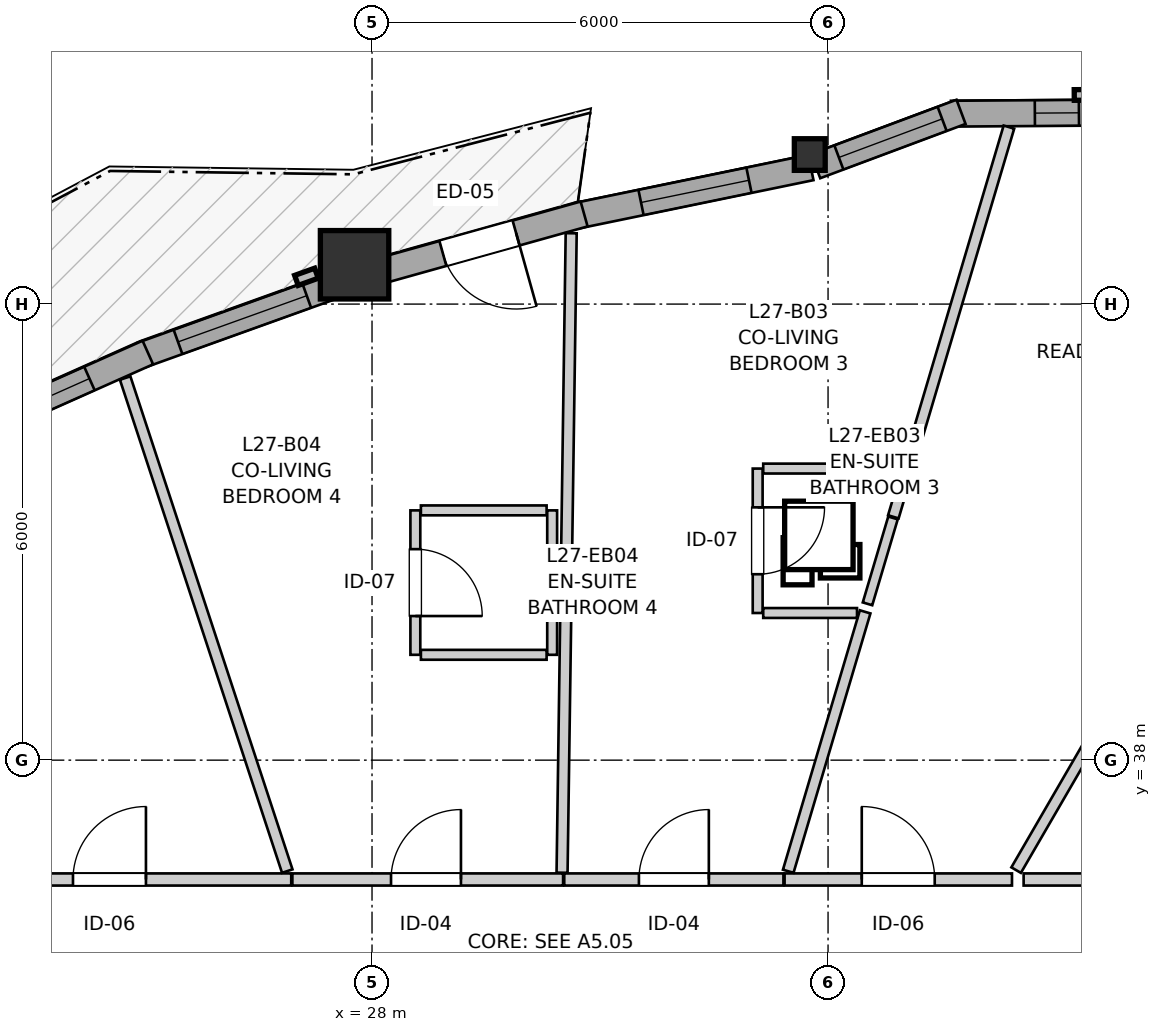
"""IFC4 building model, lengths in metres.
Left out: names, types, materials, properties, quantities, classifications, styles, units other than length and angle.
Written with IfcOpenShell. Run it as: python <this file> out.ifc"""

import sys

from ifc_helpers import new_model, si_unit, direction, frame, frame_2d, origin, origin_2d, place, context, subcontext, project, spatial, rectangle, i_section, extrude, source, transform, mapped, element, fill, save


model = new_model("IFC4")
c1 = context("Model", 3, precision=1e-05, world=origin(), true_north=direction((0.0, 1.0)))
c2 = subcontext(c1, "Body", "Model", "MODEL_VIEW")
j1 = project(units=[si_unit("LENGTHUNIT", "METRE"), si_unit("PLANEANGLEUNIT", "RADIAN")], contexts=[c1])
p1 = place(None, origin())
s1 = spatial("IfcSite", under=j1, at=p1, CompositionType="ELEMENT")
p2 = place(p1, origin())
s2 = spatial("IfcBuilding", under=s1, at=p2, CompositionType="ELEMENT")
p3 = place(p2, frame((0.0, 0.0, 92.8)))
s3 = spatial("IfcBuildingStorey", under=s2, at=p3, CompositionType="ELEMENT", Elevation=92.8)
m1 = source(origin(), c2, "Body", "SweptSolid", [
    extrude(i_section(OverallWidth=0.406, OverallDepth=0.416, WebThickness=0.027, FlangeThickness=0.044, FilletRadius=0.015, at=origin_2d()), origin(), (0.0, 0.0, 1.0), 2.95),
])
p4 = place(p3, frame((33.76, 45.968, 0.0), z_axis=(0.0, 0.0, 1.0), x_axis=(1.0, 0.0, 0.0)))
e1 = element("IfcColumn", 1, at=p4, inside=s3, PredefinedType="PILASTER", context=c2, shape_type="MappedRepresentation", body=[
    mapped(m1, transform((0.0, 0.0, 0.0), x_axis=(1.0, 0.0, 0.0), y_axis=(0.0, 1.0, 0.0), z_axis=(0.0, 0.0, 1.0), scale=1.0)),
])
m2 = source(origin(), c2, "Body", "SweptSolid", [
    extrude(rectangle(XDim=0.9, YDim=0.9, at=origin_2d()), origin(), (0.0, 0.0, 1.0), 2.95),
])
p5 = place(p3, frame((27.77, 44.517, 0.0), z_axis=(0.0, 0.0, 1.0), x_axis=(1.0, 0.0, 0.0)))
e2 = element("IfcColumn", 2, at=p5, inside=s3, PredefinedType="COLUMN", context=c2, shape_type="MappedRepresentation", body=[
    mapped(m2, transform((0.0, 0.0, 0.0), x_axis=(1.0, 0.0, 0.0), y_axis=(0.0, 1.0, 0.0), z_axis=(0.0, 0.0, 1.0), scale=1.0)),
])
p6 = place(p3, frame((37.717, 46.519, 0.0), z_axis=(0.0, 0.0, 1.0), x_axis=(-0.999976451414, -0.006862697526, 0.0)))
e3 = element("IfcWall", 3, at=p6, inside=s3, PredefinedType="SOLIDWALL", context=c2, shape_type="SweptSolid", body=[
    extrude(rectangle(XDim=2.099, YDim=0.34, at=frame_2d((1.049, 0.0))), origin(), (0.0, 0.0, 1.0), 2.48),
])
p7 = place(p6, frame((0.416, 0.0, 0.82)))
e4 = element("IfcOpeningElement", 4, at=p7, cuts=e3, PredefinedType="OPENING", context=c2, shape_type="SweptSolid", body=[
    extrude(rectangle(XDim=0.58, YDim=1.35, at=frame_2d((0.29, 0.675))), frame((0.0, 0.18, 0.0), z_axis=(0.0, -1.0, 0.0), x_axis=(1.0, 0.0, 0.0)), (0.0, 0.0, 1.0), 0.36),
])
p8 = place(p3, frame((35.75, 46.529, 0.0), z_axis=(0.0, 0.0, 1.0), x_axis=(-0.9368002254, -0.349864741994, 0.0)))
e5 = element("IfcWall", 5, at=p8, inside=s3, PredefinedType="SOLIDWALL", context=c2, shape_type="SweptSolid", body=[
    extrude(rectangle(XDim=2.041, YDim=0.34, at=frame_2d((1.021, 0.0))), origin(), (0.0, 0.0, 1.0), 2.48),
])
p9 = place(p8, frame((0.265, 0.0, 0.82)))
e6 = element("IfcOpeningElement", 6, at=p9, cuts=e5, PredefinedType="OPENING", context=c2, shape_type="SweptSolid", body=[
    extrude(rectangle(XDim=1.45, YDim=1.25, at=frame_2d((0.725, 0.625))), frame((0.0, 0.18, 0.0), z_axis=(0.0, -1.0, 0.0), x_axis=(1.0, 0.0, 0.0)), (0.0, 0.0, 1.0), 0.36),
])
p10 = place(p3, frame((33.774, 45.797, 0.0), z_axis=(0.0, 0.0, 1.0), x_axis=(-0.979428519707, -0.201791414051, 0.0)))
e7 = element("IfcWall", 7, at=p10, inside=s3, PredefinedType="SOLIDWALL", context=c2, shape_type="SweptSolid", body=[
    extrude(rectangle(XDim=3.134, YDim=0.34, at=frame_2d((1.567, 0.0))), origin(), (0.0, 0.0, 1.0), 2.48),
])
p11 = place(p10, frame((0.832, 0.0, 0.82)))
e8 = element("IfcOpeningElement", 8, at=p11, cuts=e7, PredefinedType="OPENING", context=c2, shape_type="SweptSolid", body=[
    extrude(rectangle(XDim=1.45, YDim=1.25, at=frame_2d((0.725, 0.625))), frame((0.0, 0.18, 0.0), z_axis=(0.0, -1.0, 0.0), x_axis=(1.0, 0.0, 0.0)), (0.0, 0.0, 1.0), 0.36),
])
p12 = place(p3, frame((30.79, 45.185, 0.0), z_axis=(0.0, 0.0, 1.0), x_axis=(-0.963052677404, -0.269313090187, 0.0)))
e9 = element("IfcWall", 9, at=p12, inside=s3, PredefinedType="SOLIDWALL", context=c2, shape_type="SweptSolid", body=[
    extrude(rectangle(XDim=2.858, YDim=0.34, at=frame_2d((1.429, 0.0))), origin(), (0.0, 0.0, 1.0), 2.48),
])
p13 = place(p12, frame((0.929, 0.0, 0.0)))
e10 = element("IfcOpeningElement", 10, at=p13, cuts=e9, PredefinedType="OPENING", context=c2, shape_type="SweptSolid", body=[
    extrude(rectangle(XDim=1.0, YDim=2.1, at=frame_2d((0.5, 1.05))), frame((0.0, 0.18, 0.0), z_axis=(0.0, -1.0, 0.0), x_axis=(1.0, 0.0, 0.0)), (0.0, 0.0, 1.0), 0.36),
])
p14 = place(p3, frame((27.611, 44.28, 0.0), z_axis=(0.0, 0.0, 1.0), x_axis=(-0.94110108123, -0.338125353836, 0.0)))
e11 = element("IfcWall", 11, at=p14, inside=s3, PredefinedType="SOLIDWALL", context=c2, shape_type="SweptSolid", body=[
    extrude(rectangle(XDim=2.809, YDim=0.34, at=frame_2d((1.404, 0.0))), origin(), (0.0, 0.0, 1.0), 2.48),
])
p15 = place(p14, frame((0.499, 0.0, 0.82)))
e12 = element("IfcOpeningElement", 12, at=p15, cuts=e11, PredefinedType="OPENING", context=c2, shape_type="SweptSolid", body=[
    extrude(rectangle(XDim=1.8, YDim=1.45, at=frame_2d((0.9, 0.725))), frame((0.0, 0.18, 0.0), z_axis=(0.0, -1.0, 0.0), x_axis=(1.0, 0.0, 0.0)), (0.0, 0.0, 1.0), 0.36),
])
p16 = place(p3, frame((25.05, 43.363, 0.0), z_axis=(0.0, 0.0, 1.0), x_axis=(-0.913433400489, -0.406988234315, 0.0)))
e13 = element("IfcWall", 13, at=p16, inside=s3, PredefinedType="SOLIDWALL", context=c2, shape_type="SweptSolid", body=[
    extrude(rectangle(XDim=2.985, YDim=0.34, at=frame_2d((1.492, 0.0))), origin(), (0.0, 0.0, 1.0), 2.48),
])
p17 = place(p16, frame((0.841, 0.0, 0.82)))
e14 = element("IfcOpeningElement", 14, at=p17, cuts=e13, PredefinedType="OPENING", context=c2, shape_type="SweptSolid", body=[
    extrude(rectangle(XDim=1.65, YDim=1.45, at=frame_2d((0.825, 0.725))), frame((0.0, 0.18, 0.0), z_axis=(0.0, -1.0, 0.0), x_axis=(1.0, 0.0, 0.0)), (0.0, 0.0, 1.0), 0.36),
])
p18 = place(p3, frame((22.17, 36.43, 0.0), z_axis=(0.0, 0.0, 1.0), x_axis=(1.0, 0.0, 0.0)))
e15 = element("IfcWall", 15, at=p18, inside=s3, PredefinedType="PARTITIONING", context=c2, shape_type="SweptSolid", body=[
    extrude(rectangle(XDim=4.767, YDim=0.16, at=frame_2d((2.384, 0.0))), origin(), (0.0, 0.0, 1.0), 2.588),
])
p19 = place(p18, frame((1.896, 0.0, 0.0)))
e16 = element("IfcOpeningElement", 16, at=p19, cuts=e15, PredefinedType="OPENING", context=c2, shape_type="SweptSolid", body=[
    extrude(rectangle(XDim=0.96, YDim=2.1, at=frame_2d((0.48, 1.05))), frame((0.0, 0.09, 0.0), z_axis=(0.0, -1.0, 0.0), x_axis=(1.0, 0.0, 0.0)), (0.0, 0.0, 1.0), 0.18),
])
p20 = place(p3, frame((26.952, 36.43, 0.0), z_axis=(0.0, 0.0, 1.0), x_axis=(1.0, 0.0, 0.0)))
e17 = element("IfcWall", 17, at=p20, inside=s3, PredefinedType="PARTITIONING", context=c2, shape_type="SweptSolid", body=[
    extrude(rectangle(XDim=3.562, YDim=0.16, at=frame_2d((1.781, 0.0))), origin(), (0.0, 0.0, 1.0), 2.95),
])
p21 = place(p20, frame((1.298, 0.0, 0.0)))
e18 = element("IfcOpeningElement", 18, at=p21, cuts=e17, PredefinedType="OPENING", context=c2, shape_type="SweptSolid", body=[
    extrude(rectangle(XDim=0.92, YDim=2.1, at=frame_2d((0.46, 1.05))), frame((0.0, 0.09, 0.0), z_axis=(0.0, -1.0, 0.0), x_axis=(1.0, 0.0, 0.0)), (0.0, 0.0, 1.0), 0.18),
])
p22 = place(p3, frame((33.428, 36.43, 0.0), z_axis=(0.0, 0.0, 1.0), x_axis=(1.0, 0.0, 0.0)))
e19 = element("IfcWall", 19, at=p22, inside=s3, PredefinedType="PARTITIONING", context=c2, shape_type="SweptSolid", body=[
    extrude(rectangle(XDim=2.992, YDim=0.16, at=frame_2d((1.496, 0.0))), origin(), (0.0, 0.0, 1.0), 2.95),
])
p23 = place(p22, frame((1.015, 0.0, 0.0)))
e20 = element("IfcOpeningElement", 20, at=p23, cuts=e19, PredefinedType="OPENING", context=c2, shape_type="SweptSolid", body=[
    extrude(rectangle(XDim=0.96, YDim=2.1, at=frame_2d((0.48, 1.05))), frame((0.0, 0.09, 0.0), z_axis=(0.0, -1.0, 0.0), x_axis=(1.0, 0.0, 0.0)), (0.0, 0.0, 1.0), 0.18),
])
p24 = place(p3, frame((30.529, 36.43, 0.0), z_axis=(0.0, 0.0, 1.0), x_axis=(1.0, 0.0, 0.0)))
e21 = element("IfcWall", 21, at=p24, inside=s3, PredefinedType="PARTITIONING", context=c2, shape_type="SweptSolid", body=[
    extrude(rectangle(XDim=2.884, YDim=0.16, at=frame_2d((1.442, 0.0))), origin(), (0.0, 0.0, 1.0), 2.95),
])
p25 = place(p24, frame((0.982, 0.0, 0.0)))
e22 = element("IfcOpeningElement", 22, at=p25, cuts=e21, PredefinedType="OPENING", context=c2, shape_type="SweptSolid", body=[
    extrude(rectangle(XDim=0.92, YDim=2.1, at=frame_2d((0.46, 1.05))), frame((0.0, 0.09, 0.0), z_axis=(0.0, -1.0, 0.0), x_axis=(1.0, 0.0, 0.0)), (0.0, 0.0, 1.0), 0.18),
])
p26 = place(p3, frame((33.074, 41.836, 0.0), z_axis=(0.0, 0.0, 1.0), x_axis=(0.0, -1.0, 0.0)))
e23 = element("IfcWall", 23, at=p26, inside=s3, PredefinedType="PARTITIONING", context=c2, shape_type="SweptSolid", body=[
    extrude(rectangle(XDim=1.9, YDim=0.13, at=frame_2d((0.95, 0.0))), origin(), (0.0, 0.0, 1.0), 2.95),
])
p27 = place(p26, frame((0.51, 0.0, 0.0)))
e24 = element("IfcOpeningElement", 24, at=p27, cuts=e23, PredefinedType="OPENING", context=c2, shape_type="SweptSolid", body=[
    extrude(rectangle(XDim=0.88, YDim=2.05, at=frame_2d((0.44, 1.025))), frame((0.0, 0.075, 0.0), z_axis=(0.0, -1.0, 0.0), x_axis=(1.0, 0.0, 0.0)), (0.0, 0.0, 1.0), 0.15),
])
p28 = place(p3, frame((28.57, 41.286, 0.0), z_axis=(0.0, 0.0, 1.0), x_axis=(0.0, -1.0, 0.0)))
e25 = element("IfcWall", 25, at=p28, inside=s3, PredefinedType="PARTITIONING", context=c2, shape_type="SweptSolid", body=[
    extrude(rectangle(XDim=1.9, YDim=0.13, at=frame_2d((0.95, 0.0))), origin(), (0.0, 0.0, 1.0), 2.368),
])
p29 = place(p28, frame((0.51, 0.0, 0.0)))
e26 = element("IfcOpeningElement", 26, at=p29, cuts=e25, PredefinedType="OPENING", context=c2, shape_type="SweptSolid", body=[
    extrude(rectangle(XDim=0.88, YDim=2.05, at=frame_2d((0.44, 1.025))), frame((0.0, 0.075, 0.0), z_axis=(0.0, -1.0, 0.0), x_axis=(1.0, 0.0, 0.0)), (0.0, 0.0, 1.0), 0.15),
])
p30 = place(p3, frame((36.475, 36.553, 0.0), z_axis=(0.0, 0.0, 1.0), x_axis=(0.501895508122, 0.864928262301, 0.0)))
e27 = element("IfcWall", 27, at=p30, inside=s3, PredefinedType="PARTITIONING", context=c2, shape_type="SweptSolid", body=[
    extrude(rectangle(XDim=8.958, YDim=0.145, at=frame_2d((4.479, 0.0))), origin(), (0.0, 0.0, 1.0), 2.95),
])
p31 = place(p3, frame((30.5, 36.519, 0.0), z_axis=(0.0, 0.0, 1.0), x_axis=(0.014275968132, 0.999898093174, 0.0)))
e28 = element("IfcWall", 28, at=p31, inside=s3, PredefinedType="PARTITIONING", context=c2, shape_type="SweptSolid", body=[
    extrude(rectangle(XDim=8.414, YDim=0.145, at=frame_2d((4.207, 0.0))), origin(), (0.0, 0.0, 1.0), 2.95),
])
p32 = place(p3, frame((24.752, 43.027, 0.0), z_axis=(0.0, 0.0, 1.0), x_axis=(0.312342290808, -0.949969627606, 0.0)))
e29 = element("IfcWall", 29, at=p32, inside=s3, PredefinedType="PARTITIONING", context=c2, shape_type="SweptSolid", body=[
    extrude(rectangle(XDim=6.828, YDim=0.145, at=frame_2d((3.414, 0.0))), origin(), (0.0, 0.0, 1.0), 2.95),
])
p33 = place(p3, frame((34.859, 41.201, 0.0), z_axis=(0.0, 0.0, 1.0), x_axis=(0.284335435967, 0.958724861393, 0.0)))
e30 = element("IfcWall", 30, at=p33, inside=s3, PredefinedType="PARTITIONING", context=c2, shape_type="SweptSolid", body=[
    extrude(rectangle(XDim=5.348, YDim=0.145, at=frame_2d((2.674, 0.0))), origin(), (0.0, 0.0, 1.0), 2.95),
])
p34 = place(p3, frame((33.476, 36.538, 0.0), z_axis=(0.0, 0.0, 1.0), x_axis=(0.284300835747, 0.958735122332, 0.0)))
e31 = element("IfcWall", 31, at=p34, inside=s3, PredefinedType="PARTITIONING", context=c2, shape_type="SweptSolid", body=[
    extrude(rectangle(XDim=3.56, YDim=0.145, at=frame_2d((1.78, 0.0))), origin(), (0.0, 0.0, 1.0), 2.95),
])
p35 = place(p3, frame((36.573, 36.43, 0.0), z_axis=(0.0, 0.0, 1.0), x_axis=(1.0, 0.0, 0.0)))
e32 = element("IfcWall", 32, at=p35, inside=s3, PredefinedType="PARTITIONING", context=c2, shape_type="SweptSolid", body=[
    extrude(rectangle(XDim=1.869, YDim=0.16, at=frame_2d((0.934, 0.0))), origin(), (0.0, 0.0, 1.0), 2.588),
])
p36 = place(p3, frame((30.37, 39.386, 0.0), z_axis=(0.0, 0.0, 1.0), x_axis=(0.0, 1.0, 0.0)))
e33 = element("IfcWall", 33, at=p36, inside=s3, PredefinedType="PARTITIONING", context=c2, shape_type="SweptSolid", body=[
    extrude(rectangle(XDim=1.9, YDim=0.13, at=frame_2d((0.95, 0.0))), origin(), (0.0, 0.0, 1.0), 2.95),
])
p37 = place(p3, frame((33.147, 41.836, 0.0), z_axis=(0.0, 0.0, 1.0), x_axis=(1.0, 0.0, 0.0)))
e34 = element("IfcWall", 34, at=p37, inside=s3, PredefinedType="PARTITIONING", context=c2, shape_type="SweptSolid", body=[
    extrude(rectangle(XDim=1.727, YDim=0.13, at=frame_2d((0.864, 0.0))), origin(), (0.0, 0.0, 1.0), 2.95),
])
p38 = place(p3, frame((28.643, 41.286, 0.0), z_axis=(0.0, 0.0, 1.0), x_axis=(1.0, 0.0, 0.0)))
e35 = element("IfcWall", 35, at=p38, inside=s3, PredefinedType="PARTITIONING", context=c2, shape_type="SweptSolid", body=[
    extrude(rectangle(XDim=1.654, YDim=0.13, at=frame_2d((0.827, 0.0))), origin(), (0.0, 0.0, 1.0), 2.558),
])
p39 = place(p3, frame((28.643, 39.386, 0.0), z_axis=(0.0, 0.0, 1.0), x_axis=(1.0, 0.0, 0.0)))
e36 = element("IfcWall", 36, at=p39, inside=s3, PredefinedType="PARTITIONING", context=c2, shape_type="SweptSolid", body=[
    extrude(rectangle(XDim=1.654, YDim=0.13, at=frame_2d((0.827, 0.0))), origin(), (0.0, 0.0, 1.0), 2.95),
])
p40 = place(p3, frame((33.147, 39.936, 0.0), z_axis=(0.0, 0.0, 1.0), x_axis=(1.0, 0.0, 0.0)))
e37 = element("IfcWall", 37, at=p40, inside=s3, PredefinedType="PARTITIONING", context=c2, shape_type="SweptSolid", body=[
    extrude(rectangle(XDim=1.234, YDim=0.13, at=frame_2d((0.617, 0.0))), origin(), (0.0, 0.0, 1.0), 2.558),
])
p41 = place(p3, frame((34.519, 40.057, 0.0), z_axis=(0.0, 0.0, 1.0), x_axis=(0.284363334184, 0.958716586991, 0.0)))
e38 = element("IfcWall", 38, at=p41, inside=s3, PredefinedType="PARTITIONING", context=c2, shape_type="SweptSolid", body=[
    extrude(rectangle(XDim=1.179, YDim=0.13, at=frame_2d((0.589, 0.0))), origin(), (0.0, 0.0, 1.0), 2.95),
])
p42 = place(p3, frame((34.874, 41.477, 0.0), z_axis=(0.0, 0.0, 1.0), x_axis=(0.0, 1.0, 0.0)))
e39 = element("IfcWall", 39, at=p42, inside=s3, PredefinedType="PARTITIONING", context=c2, shape_type="SweptSolid", body=[
    extrude(rectangle(XDim=0.359, YDim=0.13, at=frame_2d((0.179, 0.0))), origin(), (0.0, 0.0, 1.0), 2.95),
])
m3 = source(origin(), c2, "Body", "SweptSolid", [
    extrude(rectangle(XDim=0.58, YDim=1.35, at=frame_2d((0.29, 0.675))), frame((0.0, 0.03, 0.0), z_axis=(0.0, -1.0, 0.0), x_axis=(1.0, 0.0, 0.0)), (0.0, 0.0, 1.0), 0.06),
])
p43 = place(p7, origin())
e40 = element("IfcWindow", 40, at=p43, inside=s3, PartitioningType="SINGLE_PANEL", PredefinedType="WINDOW", context=c2, shape_type="MappedRepresentation", body=[
    mapped(m3, transform((0.0, 0.0, 0.0), x_axis=(1.0, 0.0, 0.0), y_axis=(0.0, 1.0, 0.0), z_axis=(0.0, 0.0, 1.0), scale=1.0)),
])
fill(e4, e40)
m4 = source(origin(), c2, "Body", "SweptSolid", [
    extrude(rectangle(XDim=1.45, YDim=1.25, at=frame_2d((0.725, 0.625))), frame((0.0, 0.03, 0.0), z_axis=(0.0, -1.0, 0.0), x_axis=(1.0, 0.0, 0.0)), (0.0, 0.0, 1.0), 0.06),
])
p44 = place(p9, origin())
e41 = element("IfcWindow", 41, at=p44, inside=s3, PartitioningType="SINGLE_PANEL", PredefinedType="WINDOW", context=c2, shape_type="MappedRepresentation", body=[
    mapped(m4, transform((0.0, 0.0, 0.0), x_axis=(1.0, 0.0, 0.0), y_axis=(0.0, 1.0, 0.0), z_axis=(0.0, 0.0, 1.0), scale=1.0)),
])
fill(e6, e41)
p45 = place(p11, origin())
e42 = element("IfcWindow", 42, at=p45, inside=s3, PartitioningType="SINGLE_PANEL", PredefinedType="WINDOW", context=c2, shape_type="MappedRepresentation", body=[
    mapped(m4, transform((0.0, 0.0, 0.0), x_axis=(1.0, 0.0, 0.0), y_axis=(0.0, 1.0, 0.0), z_axis=(0.0, 0.0, 1.0), scale=1.0)),
])
fill(e8, e42)
m5 = source(origin(), c2, "Body", "SweptSolid", [
    extrude(rectangle(XDim=1.8, YDim=1.45, at=frame_2d((0.9, 0.725))), frame((0.0, 0.03, 0.0), z_axis=(0.0, -1.0, 0.0), x_axis=(1.0, 0.0, 0.0)), (0.0, 0.0, 1.0), 0.06),
])
p46 = place(p15, origin())
e43 = element("IfcWindow", 43, at=p46, inside=s3, PartitioningType="SINGLE_PANEL", PredefinedType="WINDOW", context=c2, shape_type="MappedRepresentation", body=[
    mapped(m5, transform((0.0, 0.0, 0.0), x_axis=(1.0, 0.0, 0.0), y_axis=(0.0, 1.0, 0.0), z_axis=(0.0, 0.0, 1.0), scale=1.0)),
])
fill(e12, e43)
m6 = source(origin(), c2, "Body", "SweptSolid", [
    extrude(rectangle(XDim=1.65, YDim=1.45, at=frame_2d((0.825, 0.725))), frame((0.0, 0.03, 0.0), z_axis=(0.0, -1.0, 0.0), x_axis=(1.0, 0.0, 0.0)), (0.0, 0.0, 1.0), 0.06),
])
p47 = place(p17, origin())
e44 = element("IfcWindow", 44, at=p47, inside=s3, PartitioningType="SINGLE_PANEL", PredefinedType="WINDOW", context=c2, shape_type="MappedRepresentation", body=[
    mapped(m6, transform((0.0, 0.0, 0.0), x_axis=(1.0, 0.0, 0.0), y_axis=(0.0, 1.0, 0.0), z_axis=(0.0, 0.0, 1.0), scale=1.0)),
])
fill(e14, e44)
m7 = source(origin(), c2, "Body", "SweptSolid", [
    extrude(rectangle(XDim=1.0, YDim=2.1, at=frame_2d((0.5, 1.05))), frame((0.0, 0.025, 0.0), z_axis=(0.0, -1.0, 0.0), x_axis=(1.0, 0.0, 0.0)), (0.0, 0.0, 1.0), 0.05),
])
p48 = place(p13, origin())
e45 = element("IfcDoor", 45, at=p48, inside=s3, OperationType="SINGLE_SWING_LEFT", PredefinedType="DOOR", context=c2, shape_type="MappedRepresentation", body=[
    mapped(m7, transform((0.0, 0.0, 0.0), x_axis=(1.0, 0.0, 0.0), y_axis=(0.0, 1.0, 0.0), z_axis=(0.0, 0.0, 1.0), scale=1.0)),
])
fill(e10, e45)
m8 = source(origin(), c2, "Body", "SweptSolid", [
    extrude(rectangle(XDim=0.96, YDim=2.1, at=frame_2d((0.48, 1.05))), frame((0.0, 0.025, 0.0), z_axis=(0.0, -1.0, 0.0), x_axis=(1.0, 0.0, 0.0)), (0.0, 0.0, 1.0), 0.05),
])
p49 = place(p19, origin())
e46 = element("IfcDoor", 46, at=p49, inside=s3, OperationType="SINGLE_SWING_RIGHT", PredefinedType="DOOR", context=c2, shape_type="MappedRepresentation", body=[
    mapped(m8, transform((0.0, 0.0, 0.0), x_axis=(1.0, 0.0, 0.0), y_axis=(0.0, 1.0, 0.0), z_axis=(0.0, 0.0, 1.0), scale=1.0)),
])
fill(e16, e46)
m9 = source(origin(), c2, "Body", "SweptSolid", [
    extrude(rectangle(XDim=0.92, YDim=2.1, at=frame_2d((0.46, 1.05))), frame((0.0, 0.025, 0.0), z_axis=(0.0, -1.0, 0.0), x_axis=(1.0, 0.0, 0.0)), (0.0, 0.0, 1.0), 0.05),
])
p50 = place(p21, origin())
e47 = element("IfcDoor", 47, at=p50, inside=s3, OperationType="SINGLE_SWING_RIGHT", PredefinedType="DOOR", context=c2, shape_type="MappedRepresentation", body=[
    mapped(m9, transform((0.0, 0.0, 0.0), x_axis=(1.0, 0.0, 0.0), y_axis=(0.0, 1.0, 0.0), z_axis=(0.0, 0.0, 1.0), scale=1.0)),
])
fill(e18, e47)
p51 = place(p23, origin())
e48 = element("IfcDoor", 48, at=p51, inside=s3, OperationType="SINGLE_SWING_LEFT", PredefinedType="DOOR", context=c2, shape_type="MappedRepresentation", body=[
    mapped(m8, transform((0.0, 0.0, 0.0), x_axis=(1.0, 0.0, 0.0), y_axis=(0.0, 1.0, 0.0), z_axis=(0.0, 0.0, 1.0), scale=1.0)),
])
fill(e20, e48)
p52 = place(p25, origin())
e49 = element("IfcDoor", 49, at=p52, inside=s3, OperationType="SINGLE_SWING_RIGHT", PredefinedType="DOOR", context=c2, shape_type="MappedRepresentation", body=[
    mapped(m9, transform((0.0, 0.0, 0.0), x_axis=(1.0, 0.0, 0.0), y_axis=(0.0, 1.0, 0.0), z_axis=(0.0, 0.0, 1.0), scale=1.0)),
])
fill(e22, e49)
m10 = source(origin(), c2, "Body", "SweptSolid", [
    extrude(rectangle(XDim=0.88, YDim=2.05, at=frame_2d((0.44, 1.025))), frame((0.0, 0.025, 0.0), z_axis=(0.0, -1.0, 0.0), x_axis=(1.0, 0.0, 0.0)), (0.0, 0.0, 1.0), 0.05),
])
p53 = place(p27, origin())
e50 = element("IfcDoor", 50, at=p53, inside=s3, OperationType="SINGLE_SWING_LEFT", PredefinedType="DOOR", context=c2, shape_type="MappedRepresentation", body=[
    mapped(m10, transform((0.0, 0.0, 0.0), x_axis=(1.0, 0.0, 0.0), y_axis=(0.0, 1.0, 0.0), z_axis=(0.0, 0.0, 1.0), scale=1.0)),
])
fill(e24, e50)
p54 = place(p29, origin())
e51 = element("IfcDoor", 51, at=p54, inside=s3, OperationType="SINGLE_SWING_RIGHT", PredefinedType="DOOR", context=c2, shape_type="MappedRepresentation", body=[
    mapped(m10, transform((0.0, 0.0, 0.0), x_axis=(1.0, 0.0, 0.0), y_axis=(0.0, 1.0, 0.0), z_axis=(0.0, 0.0, 1.0), scale=1.0)),
])
fill(e26, e51)
save(model, sys.argv[1])
